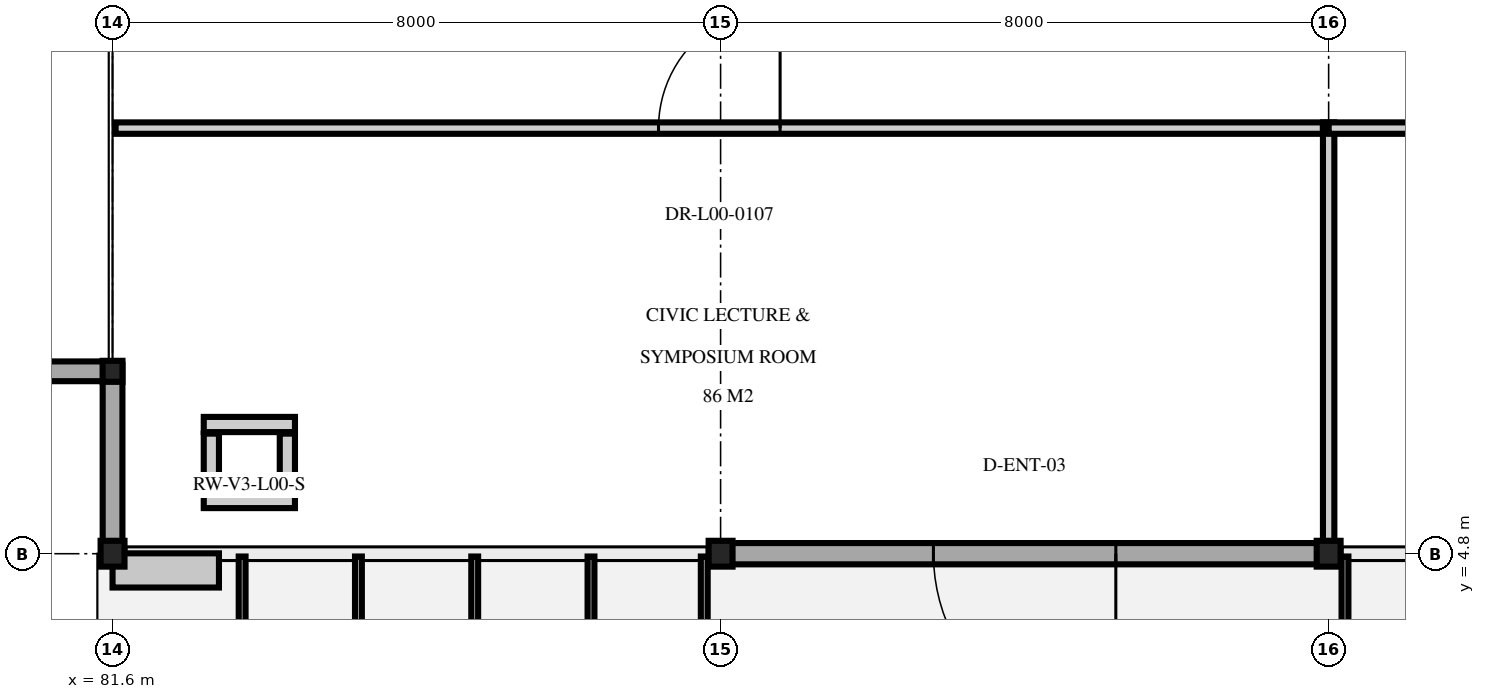
"""IFC4 building model, lengths in metres.
Left out: names, types, materials, properties, quantities, classifications, styles, units other than length and angle.
Written with IfcOpenShell. Run it as: python <this file> out.ifc"""

import sys

from ifc_helpers import new_model, si_unit, direction, frame, frame_2d, origin, origin_2d, place, context, subcontext, project, spatial, rectangle, i_section, extrude, element, fill, save


model = new_model("IFC4")
c1 = context("Model", 3, precision=1e-05, world=origin(), true_north=direction((0.0, 1.0)))
c2 = subcontext(c1, "Body", "Model", "MODEL_VIEW")
j1 = project(units=[si_unit("LENGTHUNIT", "METRE"), si_unit("PLANEANGLEUNIT", "RADIAN")], contexts=[c1])
p1 = place(None, origin())
s1 = spatial("IfcSite", under=j1, at=p1, CompositionType="ELEMENT")
p2 = place(p1, origin())
s2 = spatial("IfcBuilding", under=s1, at=p2, CompositionType="ELEMENT")
p3 = place(p2, origin())
s3 = spatial("IfcBuildingStorey", under=s2, at=p3, CompositionType="ELEMENT", Elevation=0.0)
for number, where, z_axis, x_axis in (
    (1, (81.6, 4.8, 0.0), (0.0, 0.0, 1.0), (1.0, 0.0, 0.0)),
    (2, (89.6, 4.8, 0.0), (0.0, 0.0, 1.0), (1.0, 0.0, 0.0)),
    (3, (97.6, 4.8, 0.0), (0.0, 0.0, 1.0), (1.0, 0.0, 0.0)),
):
    element("IfcColumn", number, at=place(p3, frame(where, z_axis=z_axis, x_axis=x_axis)), inside=s3, PredefinedType="COLUMN", context=c2, shape_type="SweptSolid", body=[
        extrude(i_section(OverallWidth=0.314, OverallDepth=0.34, WebThickness=0.019, FlangeThickness=0.031, at=origin_2d()), origin(), (0.0, 0.0, 1.0), 5.1),
    ])
p4 = place(p3, frame((81.6, 7.2, 0.0), z_axis=(0.0, 0.0, 1.0), x_axis=(1.0, 0.0, 0.0)))
e4 = element("IfcColumn", 4, at=p4, inside=s3, PredefinedType="COLUMN", context=c2, shape_type="SweptSolid", body=[
    extrude(i_section(OverallWidth=0.261, OverallDepth=0.276, WebThickness=0.015, FlangeThickness=0.025, at=origin_2d()), origin(), (0.0, 0.0, 1.0), 5.1),
])
for number, where, z_axis, x_axis in (
    (5, (84.0, 5.5, 0.0), (0.0, 0.0, 1.0), (-1.0, 0.0, 0.0)),
    (6, (82.8, 6.5, 0.0), (0.0, 0.0, 1.0), (1.0, 0.0, 0.0)),
):
    element("IfcWall", number, at=place(p3, frame(where, z_axis=z_axis, x_axis=x_axis)), inside=s3, PredefinedType="PARTITIONING", context=c2, shape_type="SweptSolid", body=[
        extrude(rectangle(XDim=1.2, YDim=0.2, at=frame_2d((0.6, 0.0))), origin(), (0.0, 0.0, 1.0), 4.38),
    ])
for number, where, z_axis, x_axis in (
    (7, (82.9, 5.62, 0.0), (0.0, 0.0, 1.0), (0.0, 1.0, 0.0)),
    (8, (83.9, 6.38, 0.0), (0.0, 0.0, 1.0), (0.0, -1.0, 0.0)),
):
    element("IfcWall", number, at=place(p3, frame(where, z_axis=z_axis, x_axis=x_axis)), inside=s3, PredefinedType="PARTITIONING", context=c2, shape_type="SweptSolid", body=[
        extrude(rectangle(XDim=0.76, YDim=0.2, at=frame_2d((0.38, 0.0))), origin(), (0.0, 0.0, 1.0), 4.38),
    ])
p5 = place(p3, frame((97.685, 4.8, 0.0), z_axis=(0.0, 0.0, 1.0), x_axis=(-1.0, 0.0, 0.0)))
e9 = element("IfcWall", 9, at=p5, inside=s3, PredefinedType="SOLIDWALL", context=c2, shape_type="SweptSolid", body=[
    extrude(rectangle(XDim=8.17, YDim=0.28, at=frame_2d((4.085, 0.0))), origin(), (0.0, 0.0, 1.0), 3.805),
])
p6 = place(p5, frame((2.885, 0.0, 0.0)))
e10 = element("IfcOpeningElement", 10, at=p6, cuts=e9, PredefinedType="OPENING", context=c2, shape_type="SweptSolid", body=[
    extrude(rectangle(XDim=2.4, YDim=2.6, at=frame_2d((1.2, 1.3))), frame((0.0, 0.15, 0.0), z_axis=(0.0, -1.0, 0.0), x_axis=(1.0, 0.0, 0.0)), (0.0, 0.0, 1.0), 0.3),
])
p7 = place(p3, frame((81.6, 4.715, 0.0), z_axis=(0.0, 0.0, 1.0), x_axis=(0.0, 1.0, 0.0)))
e11 = element("IfcWall", 11, at=p7, inside=s3, PredefinedType="SOLIDWALL", context=c2, shape_type="SweptSolid", body=[
    extrude(rectangle(XDim=2.57, YDim=0.26, at=frame_2d((1.285, 0.0))), origin(), (0.0, 0.0, 1.0), 4.305),
])
p8 = place(p3, frame((81.685, 7.2, 0.0), z_axis=(0.0, 0.0, 1.0), x_axis=(-1.0, 0.0, 0.0)))
e12 = element("IfcWall", 12, at=p8, inside=s3, PredefinedType="SOLIDWALL", context=c2, shape_type="SweptSolid", body=[
    extrude(rectangle(XDim=4.97, YDim=0.26, at=frame_2d((2.485, 0.0))), origin(), (0.0, 0.0, 1.0), 4.388),
])
p9 = place(p8, frame((1.585, 0.0, 0.0)))
e13 = element("IfcOpeningElement", 13, at=p9, cuts=e12, PredefinedType="OPENING", context=c2, shape_type="SweptSolid", body=[
    extrude(rectangle(XDim=1.8, YDim=2.4, at=frame_2d((0.9, 1.2))), frame((0.0, 0.14, 0.0), z_axis=(0.0, -1.0, 0.0), x_axis=(1.0, 0.0, 0.0)), (0.0, 0.0, 1.0), 0.28),
])
p10 = place(p3, frame((81.64, 10.4, 0.0), z_axis=(0.0, 0.0, 1.0), x_axis=(1.0, 0.0, 0.0)))
e14 = element("IfcWall", 14, at=p10, inside=s3, PredefinedType="PARTITIONING", context=c2, shape_type="SweptSolid", body=[
    extrude(rectangle(XDim=15.885, YDim=0.15, at=frame_2d((7.942, 0.0))), origin(), (0.0, 0.0, 1.0), 4.405),
])
p11 = place(p10, frame((7.143, 0.0, 0.0)))
e15 = element("IfcOpeningElement", 15, at=p11, cuts=e14, PredefinedType="OPENING", context=c2, shape_type="SweptSolid", body=[
    extrude(rectangle(XDim=1.6, YDim=2.25, at=frame_2d((0.8, 1.125))), frame((0.0, 0.085, 0.0), z_axis=(0.0, -1.0, 0.0), x_axis=(1.0, 0.0, 0.0)), (0.0, 0.0, 1.0), 0.17),
])
p12 = place(p3, frame((97.6, 4.84, 0.0), z_axis=(0.0, 0.0, 1.0), x_axis=(0.0, 1.0, 0.0)))
e16 = element("IfcWall", 16, at=p12, inside=s3, PredefinedType="PARTITIONING", context=c2, shape_type="SweptSolid", body=[
    extrude(rectangle(XDim=5.635, YDim=0.15, at=frame_2d((2.817, 0.0))), origin(), (0.0, 0.0, 1.0), 3.805),
])
p13 = place(p3, frame((97.6, 10.4, 0.0), z_axis=(0.0, 0.0, 1.0), x_axis=(1.0, 0.0, 0.0)))
e17 = element("IfcWall", 17, at=p13, inside=s3, PredefinedType="PARTITIONING", context=c2, shape_type="SweptSolid", body=[
    extrude(rectangle(XDim=14.6, YDim=0.15, at=frame_2d((7.3, 0.0))), origin(), (0.0, 0.0, 1.0), 4.405),
])
p14 = place(p13, frame((6.825, 0.0, 0.0)))
e18 = element("IfcOpeningElement", 18, at=p14, cuts=e17, PredefinedType="OPENING", context=c2, shape_type="SweptSolid", body=[
    extrude(rectangle(XDim=0.95, YDim=2.15, at=frame_2d((0.475, 1.075))), frame((0.0, 0.085, 0.0), z_axis=(0.0, -1.0, 0.0), x_axis=(1.0, 0.0, 0.0)), (0.0, 0.0, 1.0), 0.17),
])
p15 = place(p6, origin())
e19 = element("IfcDoor", 19, at=p15, inside=s3, OperationType="DOUBLE_SWING_LEFT", PredefinedType="DOOR", context=c2, shape_type="SweptSolid", body=[
    extrude(rectangle(XDim=2.4, YDim=2.6, at=frame_2d((1.2, 1.3))), frame((0.0, 0.025, 0.0), z_axis=(0.0, -1.0, 0.0), x_axis=(1.0, 0.0, 0.0)), (0.0, 0.0, 1.0), 0.05),
])
fill(e10, e19)
p16 = place(p11, origin())
e20 = element("IfcDoor", 20, at=p16, inside=s3, OperationType="DOUBLE_DOOR_SINGLE_SWING", PredefinedType="DOOR", context=c2, shape_type="SweptSolid", body=[
    extrude(rectangle(XDim=1.6, YDim=2.25, at=frame_2d((0.8, 1.125))), frame((0.0, 0.025, 0.0), z_axis=(0.0, -1.0, 0.0), x_axis=(1.0, 0.0, 0.0)), (0.0, 0.0, 1.0), 0.05),
])
fill(e15, e20)
save(model, sys.argv[1])
